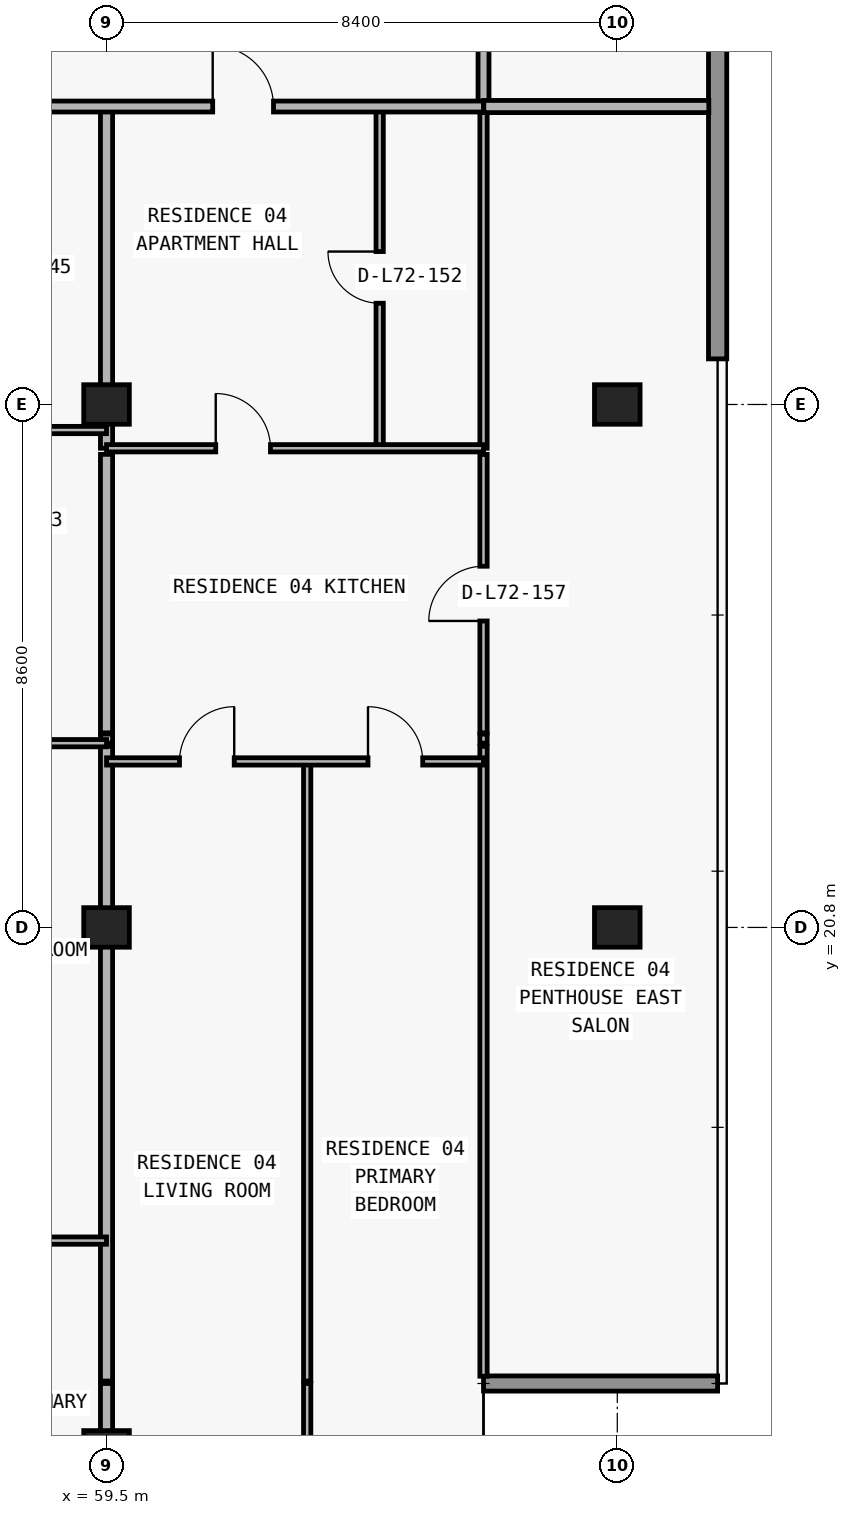
"""IFC4 building model, lengths in metres.
Left out: names, types, materials, properties, quantities, classifications, styles, units other than length and angle.
Written with IfcOpenShell. Run it as: python <this file> out.ifc"""

import sys

from ifc_helpers import new_model, si_unit, direction, frame, frame_2d, origin, origin_2d, place, context, subcontext, project, spatial, rectangle, extrude, element, fill, save


model = new_model("IFC4")
c1 = context("Model", 3, precision=1e-05, world=origin(), true_north=direction((0.0, 1.0)))
c2 = subcontext(c1, "Body", "Model", "MODEL_VIEW")
j1 = project(units=[si_unit("LENGTHUNIT", "METRE"), si_unit("PLANEANGLEUNIT", "RADIAN")], contexts=[c1])
p1 = place(None, origin())
s1 = spatial("IfcSite", under=j1, at=p1, CompositionType="ELEMENT")
p2 = place(p1, origin())
s2 = spatial("IfcBuilding", under=s1, at=p2, CompositionType="ELEMENT")
p3 = place(p2, frame((0.0, 0.0, 256.2)))
s3 = spatial("IfcBuildingStorey", under=s2, at=p3, CompositionType="ELEMENT", Elevation=256.2)
for number, where, z_axis, x_axis in (
    (1, (59.5, 12.2, 0.0), (0.0, 0.0, 1.0), (1.0, 0.0, 0.0)),
    (2, (59.5, 20.8, 0.0), (0.0, 0.0, 1.0), (1.0, 0.0, 0.0)),
    (3, (67.9, 20.8, 0.0), (0.0, 0.0, 1.0), (1.0, 0.0, 0.0)),
    (4, (59.5, 29.4, 0.0), (0.0, 0.0, 1.0), (1.0, 0.0, 0.0)),
    (5, (67.9, 29.4, 0.0), (0.0, 0.0, 1.0), (1.0, 0.0, 0.0)),
):
    element("IfcColumn", number, at=place(p3, frame(where, z_axis=z_axis, x_axis=x_axis)), inside=s3, PredefinedType="COLUMN", context=c2, shape_type="SweptSolid", body=[
        extrude(rectangle(XDim=0.75, YDim=0.65, at=origin_2d()), origin(), (0.0, 0.0, 1.0), 3.05),
    ])
p4 = place(p3, frame((65.7, 13.3, 0.0), z_axis=(0.0, 0.0, 1.0), x_axis=(1.0, 0.0, 0.0)))
e6 = element("IfcWall", 6, at=p4, inside=s3, PredefinedType="ELEMENTEDWALL", context=c2, shape_type="SweptSolid", body=[
    extrude(rectangle(XDim=3.85, YDim=0.25, at=frame_2d((1.925, 0.0))), origin(), (0.0, 0.0, 1.0), 3.05),
])
p5 = place(p3, frame((69.55, 47.0, 0.0), z_axis=(0.0, 0.0, 1.0), x_axis=(0.0, -1.0, 0.0)))
e7 = element("IfcWall", 7, at=p5, inside=s3, PredefinedType="STANDARD", context=c2, shape_type="SweptSolid", body=[
    extrude(rectangle(XDim=16.85, YDim=0.3, at=frame_2d((8.425, 0.0))), origin(), (0.0, 0.0, 1.0), 3.05),
])
p6 = place(p3, frame((59.5, 9.995, 0.0), z_axis=(0.0, 0.0, 1.0), x_axis=(0.0, 1.0, 0.0)))
e8 = element("IfcWall", 8, at=p6, inside=s3, PredefinedType="PARTITIONING", context=c2, shape_type="SweptSolid", body=[
    extrude(rectangle(XDim=3.305, YDim=0.2, at=frame_2d((1.652, 0.0))), origin(), (0.0, 0.0, 1.0), 2.263),
])
p7 = place(p3, frame((59.5, 13.34, 0.0), z_axis=(0.0, 0.0, 1.0), x_axis=(0.0, 1.0, 0.0)))
e9 = element("IfcWall", 9, at=p7, inside=s3, PredefinedType="PARTITIONING", context=c2, shape_type="SweptSolid", body=[
    extrude(rectangle(XDim=10.44, YDim=0.2, at=frame_2d((5.22, 0.0))), origin(), (0.0, 0.0, 1.0), 2.263),
])
p8 = place(p3, frame((59.5, 23.83, 0.0), z_axis=(0.0, 0.0, 1.0), x_axis=(0.0, 1.0, 0.0)))
e10 = element("IfcWall", 10, at=p8, inside=s3, PredefinedType="PARTITIONING", context=c2, shape_type="SweptSolid", body=[
    extrude(rectangle(XDim=0.15, YDim=0.2, at=frame_2d((0.075, 0.0))), origin(), (0.0, 0.0, 1.0), 2.263),
])
p9 = place(p3, frame((59.5, 24.0, 0.0), z_axis=(0.0, 0.0, 1.0), x_axis=(0.0, 1.0, 0.0)))
e11 = element("IfcWall", 11, at=p9, inside=s3, PredefinedType="PARTITIONING", context=c2, shape_type="SweptSolid", body=[
    extrude(rectangle(XDim=4.58, YDim=0.2, at=frame_2d((2.29, 0.0))), origin(), (0.0, 0.0, 1.0), 2.263),
])
p10 = place(p3, frame((59.5, 28.68, 0.0), z_axis=(0.0, 0.0, 1.0), x_axis=(0.0, 1.0, 0.0)))
e12 = element("IfcWall", 12, at=p10, inside=s3, PredefinedType="PARTITIONING", context=c2, shape_type="SweptSolid", body=[
    extrude(rectangle(XDim=5.62, YDim=0.2, at=frame_2d((2.81, 0.0))), origin(), (0.0, 0.0, 1.0), 2.263),
])
p11 = place(p3, frame((62.8, 9.995, 0.0), z_axis=(0.0, 0.0, 1.0), x_axis=(0.0, 1.0, 0.0)))
e13 = element("IfcWall", 13, at=p11, inside=s3, PredefinedType="PARTITIONING", context=c2, shape_type="SweptSolid", body=[
    extrude(rectangle(XDim=3.305, YDim=0.12, at=frame_2d((1.652, 0.0))), origin(), (0.0, 0.0, 1.0), 3.05),
])
p12 = place(p3, frame((62.8, 13.34, 0.0), z_axis=(0.0, 0.0, 1.0), x_axis=(0.0, 1.0, 0.0)))
e14 = element("IfcWall", 14, at=p12, inside=s3, PredefinedType="PARTITIONING", context=c2, shape_type="SweptSolid", body=[
    extrude(rectangle(XDim=10.19, YDim=0.12, at=frame_2d((5.095, 0.0))), origin(), (0.0, 0.0, 1.0), 3.05),
])
p13 = place(p3, frame((63.992, 28.68, 0.0), z_axis=(0.0, 0.0, 1.0), x_axis=(0.0, 1.0, 0.0)))
e15 = element("IfcWall", 15, at=p13, inside=s3, PredefinedType="PARTITIONING", context=c2, shape_type="SweptSolid", body=[
    extrude(rectangle(XDim=5.62, YDim=0.12, at=frame_2d((2.81, 0.0))), origin(), (0.0, 0.0, 1.0), 3.05),
])
p14 = place(p13, frame((2.385, 0.0, 0.0)))
e16 = element("IfcOpeningElement", 16, at=p14, cuts=e15, PredefinedType="OPENING", context=c2, shape_type="SweptSolid", body=[
    extrude(rectangle(XDim=0.85, YDim=2.1, at=frame_2d((0.425, 1.05))), frame((0.0, 0.07, 0.0), z_axis=(0.0, -1.0, 0.0), x_axis=(1.0, 0.0, 0.0)), (0.0, 0.0, 1.0), 0.14),
])
p15 = place(p3, frame((65.7, 13.42, 0.0), z_axis=(0.0, 0.0, 1.0), x_axis=(0.0, 1.0, 0.0)))
e17 = element("IfcWall", 17, at=p15, inside=s3, PredefinedType="PARTITIONING", context=c2, shape_type="SweptSolid", body=[
    extrude(rectangle(XDim=10.36, YDim=0.12, at=frame_2d((5.18, 0.0))), origin(), (0.0, 0.0, 1.0), 3.05),
])
p16 = place(p3, frame((65.7, 23.83, 0.0), z_axis=(0.0, 0.0, 1.0), x_axis=(0.0, 1.0, 0.0)))
e18 = element("IfcWall", 18, at=p16, inside=s3, PredefinedType="PARTITIONING", context=c2, shape_type="SweptSolid", body=[
    extrude(rectangle(XDim=0.15, YDim=0.12, at=frame_2d((0.075, 0.0))), origin(), (0.0, 0.0, 1.0), 3.05),
])
p17 = place(p3, frame((65.7, 24.0, 0.0), z_axis=(0.0, 0.0, 1.0), x_axis=(0.0, 1.0, 0.0)))
e19 = element("IfcWall", 19, at=p17, inside=s3, PredefinedType="PARTITIONING", context=c2, shape_type="SweptSolid", body=[
    extrude(rectangle(XDim=4.58, YDim=0.12, at=frame_2d((2.29, 0.0))), origin(), (0.0, 0.0, 1.0), 3.05),
])
p18 = place(p17, frame((1.84, 0.0, 0.0)))
e20 = element("IfcOpeningElement", 20, at=p18, cuts=e19, PredefinedType="OPENING", context=c2, shape_type="SweptSolid", body=[
    extrude(rectangle(XDim=0.9, YDim=2.15, at=frame_2d((0.45, 1.075))), frame((0.0, 0.07, 0.0), z_axis=(0.0, -1.0, 0.0), x_axis=(1.0, 0.0, 0.0)), (0.0, 0.0, 1.0), 0.14),
])
p19 = place(p3, frame((65.7, 28.68, 0.0), z_axis=(0.0, 0.0, 1.0), x_axis=(0.0, 1.0, 0.0)))
e21 = element("IfcWall", 21, at=p19, inside=s3, PredefinedType="PARTITIONING", context=c2, shape_type="SweptSolid", body=[
    extrude(rectangle(XDim=5.62, YDim=0.12, at=frame_2d((2.81, 0.0))), origin(), (0.0, 0.0, 1.0), 3.05),
])
p20 = place(p3, frame((65.7, 34.305, 0.0), z_axis=(0.0, 0.0, 1.0), x_axis=(0.0, 1.0, 0.0)))
e22 = element("IfcWall", 22, at=p20, inside=s3, PredefinedType="PARTITIONING", context=c2, shape_type="SweptSolid", body=[
    extrude(rectangle(XDim=2.695, YDim=0.18, at=frame_2d((1.348, 0.0))), origin(), (0.0, 0.0, 1.0), 3.05),
])
p21 = place(p3, frame((55.048, 15.65, 0.0), z_axis=(0.0, 0.0, 1.0), x_axis=(1.0, 0.0, 0.0)))
e23 = element("IfcWall", 23, at=p21, inside=s3, PredefinedType="PARTITIONING", context=c2, shape_type="SweptSolid", body=[
    extrude(rectangle(XDim=4.452, YDim=0.12, at=frame_2d((2.226, 0.0))), origin(), (0.0, 0.0, 1.0), 3.05),
])
p22 = place(p21, frame((1.776, 0.0, 0.0)))
e24 = element("IfcOpeningElement", 24, at=p22, cuts=e23, PredefinedType="OPENING", context=c2, shape_type="SweptSolid", body=[
    extrude(rectangle(XDim=0.9, YDim=2.15, at=frame_2d((0.45, 1.075))), frame((0.0, 0.07, 0.0), z_axis=(0.0, -1.0, 0.0), x_axis=(1.0, 0.0, 0.0)), (0.0, 0.0, 1.0), 0.14),
])
p23 = place(p3, frame((59.5, 23.53, 0.0), z_axis=(0.0, 0.0, 1.0), x_axis=(1.0, 0.0, 0.0)))
e25 = element("IfcWall", 25, at=p23, inside=s3, PredefinedType="PARTITIONING", context=c2, shape_type="SweptSolid", body=[
    extrude(rectangle(XDim=6.2, YDim=0.12, at=frame_2d((3.1, 0.0))), origin(), (0.0, 0.0, 1.0), 3.05),
])
p24 = place(p23, frame((1.2, 0.0, 0.0)))
e26 = element("IfcOpeningElement", 26, at=p24, cuts=e25, PredefinedType="OPENING", context=c2, shape_type="SweptSolid", body=[
    extrude(rectangle(XDim=0.9, YDim=2.15, at=frame_2d((0.45, 1.075))), frame((0.0, 0.07, 0.0), z_axis=(0.0, -1.0, 0.0), x_axis=(1.0, 0.0, 0.0)), (0.0, 0.0, 1.0), 0.14),
])
p25 = place(p23, frame((4.3, 0.0, 0.0)))
e27 = element("IfcOpeningElement", 27, at=p25, cuts=e25, PredefinedType="OPENING", context=c2, shape_type="SweptSolid", body=[
    extrude(rectangle(XDim=0.9, YDim=2.15, at=frame_2d((0.45, 1.075))), frame((0.0, 0.07, 0.0), z_axis=(0.0, -1.0, 0.0), x_axis=(1.0, 0.0, 0.0)), (0.0, 0.0, 1.0), 0.14),
])
p26 = place(p3, frame((51.32, 23.83, 0.0), z_axis=(0.0, 0.0, 1.0), x_axis=(1.0, 0.0, 0.0)))
e28 = element("IfcWall", 28, at=p26, inside=s3, PredefinedType="PARTITIONING", context=c2, shape_type="SweptSolid", body=[
    extrude(rectangle(XDim=8.18, YDim=0.12, at=frame_2d((4.09, 0.0))), origin(), (0.0, 0.0, 1.0), 3.05),
])
p27 = place(p26, frame((1.414, 0.0, 0.0)))
e29 = element("IfcOpeningElement", 29, at=p27, cuts=e28, PredefinedType="OPENING", context=c2, shape_type="SweptSolid", body=[
    extrude(rectangle(XDim=0.9, YDim=2.15, at=frame_2d((0.45, 1.075))), frame((0.0, 0.07, 0.0), z_axis=(0.0, -1.0, 0.0), x_axis=(1.0, 0.0, 0.0)), (0.0, 0.0, 1.0), 0.14),
])
p28 = place(p26, frame((5.798, 0.0, 0.0)))
e30 = element("IfcOpeningElement", 30, at=p28, cuts=e28, PredefinedType="OPENING", context=c2, shape_type="SweptSolid", body=[
    extrude(rectangle(XDim=0.9, YDim=2.15, at=frame_2d((0.45, 1.075))), frame((0.0, 0.07, 0.0), z_axis=(0.0, -1.0, 0.0), x_axis=(1.0, 0.0, 0.0)), (0.0, 0.0, 1.0), 0.14),
])
p29 = place(p3, frame((59.5, 28.68, 0.0), z_axis=(0.0, 0.0, 1.0), x_axis=(1.0, 0.0, 0.0)))
e31 = element("IfcWall", 31, at=p29, inside=s3, PredefinedType="PARTITIONING", context=c2, shape_type="SweptSolid", body=[
    extrude(rectangle(XDim=6.2, YDim=0.12, at=frame_2d((3.1, 0.0))), origin(), (0.0, 0.0, 1.0), 3.05),
])
p30 = place(p29, frame((1.796, 0.0, 0.0)))
e32 = element("IfcOpeningElement", 32, at=p30, cuts=e31, PredefinedType="OPENING", context=c2, shape_type="SweptSolid", body=[
    extrude(rectangle(XDim=0.9, YDim=2.15, at=frame_2d((0.45, 1.075))), frame((0.0, 0.07, 0.0), z_axis=(0.0, -1.0, 0.0), x_axis=(1.0, 0.0, 0.0)), (0.0, 0.0, 1.0), 0.14),
])
p31 = place(p3, frame((51.32, 28.98, 0.0), z_axis=(0.0, 0.0, 1.0), x_axis=(1.0, 0.0, 0.0)))
e33 = element("IfcWall", 33, at=p31, inside=s3, PredefinedType="PARTITIONING", context=c2, shape_type="SweptSolid", body=[
    extrude(rectangle(XDim=8.18, YDim=0.12, at=frame_2d((4.09, 0.0))), origin(), (0.0, 0.0, 1.0), 3.05),
])
p32 = place(p31, frame((1.708, 0.0, 0.0)))
e34 = element("IfcOpeningElement", 34, at=p32, cuts=e33, PredefinedType="OPENING", context=c2, shape_type="SweptSolid", body=[
    extrude(rectangle(XDim=0.9, YDim=2.15, at=frame_2d((0.45, 1.075))), frame((0.0, 0.07, 0.0), z_axis=(0.0, -1.0, 0.0), x_axis=(1.0, 0.0, 0.0)), (0.0, 0.0, 1.0), 0.14),
])
p33 = place(p3, frame((12.105, 34.3, 0.0), z_axis=(0.0, 0.0, 1.0), x_axis=(1.0, 0.0, 0.0)))
e35 = element("IfcWall", 35, at=p33, inside=s3, PredefinedType="PARTITIONING", context=c2, shape_type="SweptSolid", body=[
    extrude(rectangle(XDim=53.595, YDim=0.18, at=frame_2d((26.797, 0.0))), origin(), (0.0, 0.0, 1.0), 3.05),
])
p34 = place(p33, frame((1.661, 0.0, 0.0)))
e36 = element("IfcOpeningElement", 36, at=p34, cuts=e35, PredefinedType="OPENING", context=c2, shape_type="SweptSolid", body=[
    extrude(rectangle(XDim=1.0, YDim=2.2, at=frame_2d((0.5, 1.1))), frame((0.0, 0.1, 0.0), z_axis=(0.0, -1.0, 0.0), x_axis=(1.0, 0.0, 0.0)), (0.0, 0.0, 1.0), 0.2),
])
p35 = place(p33, frame((17.438, 0.0, 0.0)))
e37 = element("IfcOpeningElement", 37, at=p35, cuts=e35, PredefinedType="OPENING", context=c2, shape_type="SweptSolid", body=[
    extrude(rectangle(XDim=1.0, YDim=2.2, at=frame_2d((0.5, 1.1))), frame((0.0, 0.1, 0.0), z_axis=(0.0, -1.0, 0.0), x_axis=(1.0, 0.0, 0.0)), (0.0, 0.0, 1.0), 0.2),
])
p36 = place(p33, frame((41.727, 0.0, 0.0)))
e38 = element("IfcOpeningElement", 38, at=p36, cuts=e35, PredefinedType="OPENING", context=c2, shape_type="SweptSolid", body=[
    extrude(rectangle(XDim=1.0, YDim=2.2, at=frame_2d((0.5, 1.1))), frame((0.0, 0.1, 0.0), z_axis=(0.0, -1.0, 0.0), x_axis=(1.0, 0.0, 0.0)), (0.0, 0.0, 1.0), 0.2),
])
p37 = place(p33, frame((49.141, 0.0, 0.0)))
e39 = element("IfcOpeningElement", 39, at=p37, cuts=e35, PredefinedType="OPENING", context=c2, shape_type="SweptSolid", body=[
    extrude(rectangle(XDim=1.0, YDim=2.2, at=frame_2d((0.5, 1.1))), frame((0.0, 0.1, 0.0), z_axis=(0.0, -1.0, 0.0), x_axis=(1.0, 0.0, 0.0)), (0.0, 0.0, 1.0), 0.2),
])
p38 = place(p3, frame((65.705, 34.3, 0.0), z_axis=(0.0, 0.0, 1.0), x_axis=(1.0, 0.0, 0.0)))
e40 = element("IfcWall", 40, at=p38, inside=s3, PredefinedType="PARTITIONING", context=c2, shape_type="SweptSolid", body=[
    extrude(rectangle(XDim=3.7, YDim=0.2, at=frame_2d((1.85, 0.0))), origin(), (0.0, 0.0, 1.0), 3.05),
])
p39 = place(p37, origin())
e41 = element("IfcDoor", 41, at=p39, inside=s3, OperationType="SINGLE_SWING_LEFT", PredefinedType="DOOR", context=c2, shape_type="SweptSolid", body=[
    extrude(rectangle(XDim=1.0, YDim=2.2, at=frame_2d((0.5, 1.1))), frame((0.0, 0.025, 0.0), z_axis=(0.0, -1.0, 0.0), x_axis=(1.0, 0.0, 0.0)), (0.0, 0.0, 1.0), 0.05),
])
fill(e39, e41)
p40 = place(p14, origin())
e42 = element("IfcDoor", 42, at=p40, inside=s3, OperationType="SINGLE_SWING_RIGHT", PredefinedType="DOOR", context=c2, shape_type="SweptSolid", body=[
    extrude(rectangle(XDim=0.85, YDim=2.1, at=frame_2d((0.425, 1.05))), frame((0.0, 0.025, 0.0), z_axis=(0.0, -1.0, 0.0), x_axis=(1.0, 0.0, 0.0)), (0.0, 0.0, 1.0), 0.05),
])
fill(e16, e42)
p41 = place(p30, origin())
e43 = element("IfcDoor", 43, at=p41, inside=s3, OperationType="SINGLE_SWING_LEFT", PredefinedType="DOOR", context=c2, shape_type="SweptSolid", body=[
    extrude(rectangle(XDim=0.9, YDim=2.15, at=frame_2d((0.45, 1.075))), frame((0.0, 0.025, 0.0), z_axis=(0.0, -1.0, 0.0), x_axis=(1.0, 0.0, 0.0)), (0.0, 0.0, 1.0), 0.05),
])
fill(e32, e43)
p42 = place(p24, origin())
e44 = element("IfcDoor", 44, at=p42, inside=s3, OperationType="SINGLE_SWING_RIGHT", PredefinedType="DOOR", context=c2, shape_type="SweptSolid", body=[
    extrude(rectangle(XDim=0.9, YDim=2.15, at=frame_2d((0.45, 1.075))), frame((0.0, 0.025, 0.0), z_axis=(0.0, -1.0, 0.0), x_axis=(1.0, 0.0, 0.0)), (0.0, 0.0, 1.0), 0.05),
])
fill(e26, e44)
p43 = place(p25, origin())
e45 = element("IfcDoor", 45, at=p43, inside=s3, OperationType="SINGLE_SWING_LEFT", PredefinedType="DOOR", context=c2, shape_type="SweptSolid", body=[
    extrude(rectangle(XDim=0.9, YDim=2.15, at=frame_2d((0.45, 1.075))), frame((0.0, 0.025, 0.0), z_axis=(0.0, -1.0, 0.0), x_axis=(1.0, 0.0, 0.0)), (0.0, 0.0, 1.0), 0.05),
])
fill(e27, e45)
p44 = place(p18, origin())
e46 = element("IfcDoor", 46, at=p44, inside=s3, OperationType="SINGLE_SWING_LEFT", PredefinedType="DOOR", context=c2, shape_type="SweptSolid", body=[
    extrude(rectangle(XDim=0.9, YDim=2.15, at=frame_2d((0.45, 1.075))), frame((0.0, 0.025, 0.0), z_axis=(0.0, -1.0, 0.0), x_axis=(1.0, 0.0, 0.0)), (0.0, 0.0, 1.0), 0.05),
])
fill(e20, e46)
save(model, sys.argv[1])
